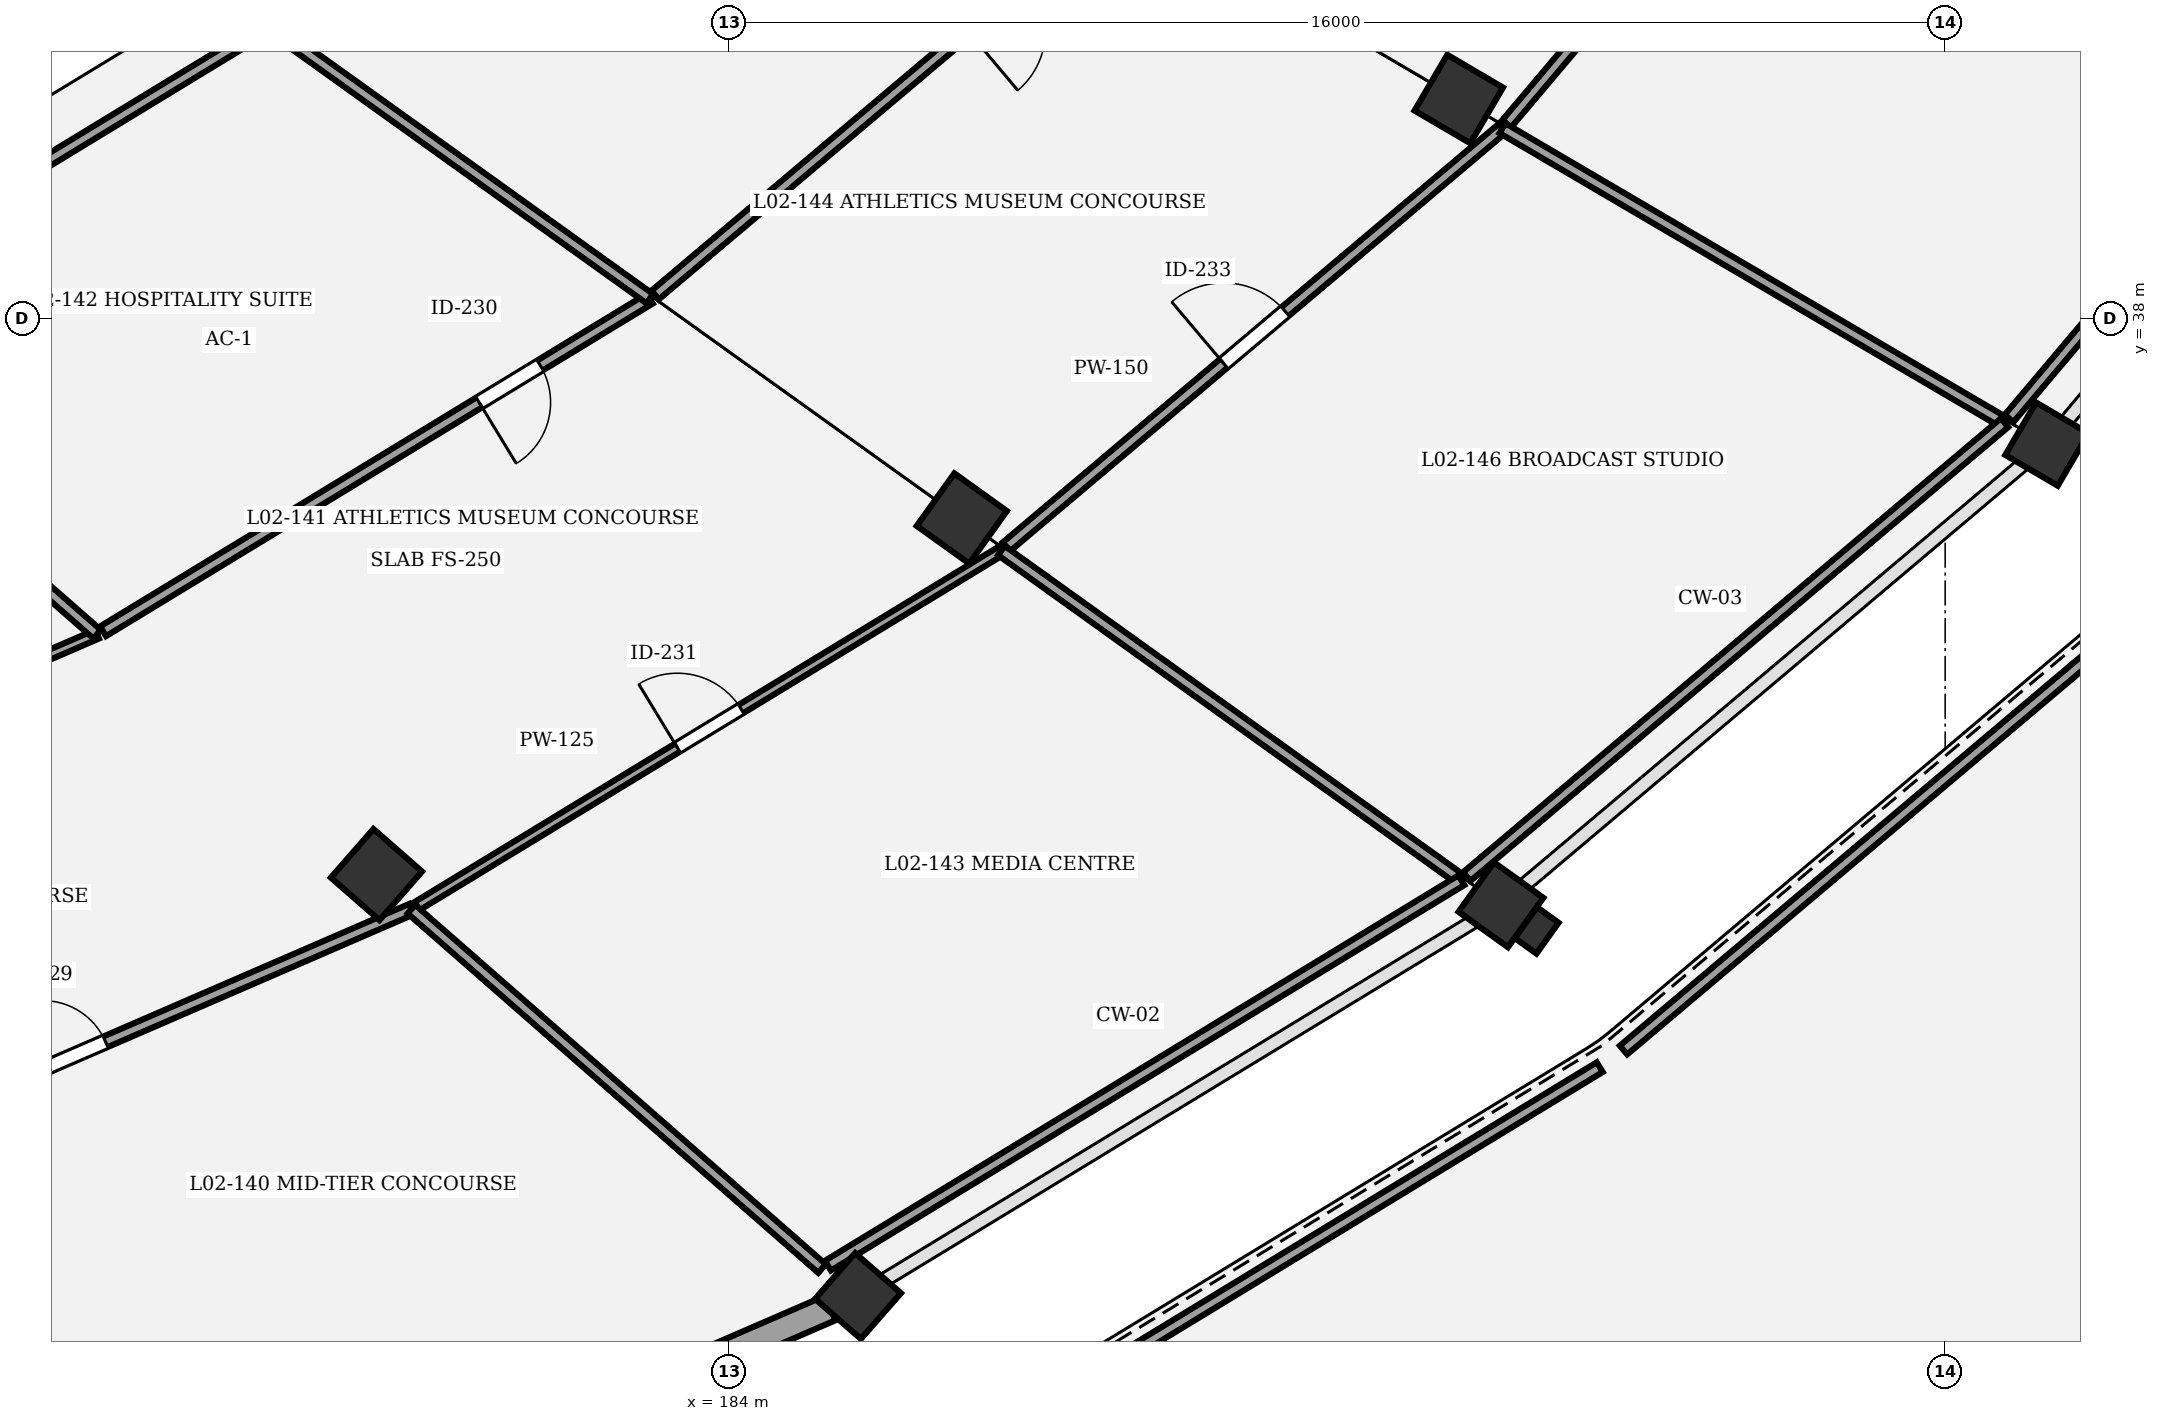
"""IFC4 building model, lengths in metres.
Left out: names, types, materials, properties, quantities, classifications, styles, units other than length and angle.
Written with IfcOpenShell. Run it as: python <this file> out.ifc"""

import sys

from ifc_helpers import new_model, si_unit, direction, frame, frame_2d, origin, origin_2d, place, context, subcontext, project, spatial, rectangle, extrude, element, fill, save


model = new_model("IFC4")
c1 = context("Model", 3, precision=1e-05, world=origin(), true_north=direction((0.0, 1.0)))
c2 = subcontext(c1, "Body", "Model", "MODEL_VIEW")
j1 = project(units=[si_unit("LENGTHUNIT", "METRE"), si_unit("PLANEANGLEUNIT", "RADIAN")], contexts=[c1])
p1 = place(None, origin())
s1 = spatial("IfcSite", under=j1, at=p1, CompositionType="ELEMENT")
p2 = place(p1, origin())
s2 = spatial("IfcBuilding", under=s1, at=p2, CompositionType="ELEMENT")
p3 = place(p2, frame((0.0, 0.0, 10.2)))
s3 = spatial("IfcBuildingStorey", under=s2, at=p3, CompositionType="ELEMENT", Elevation=10.2)
p4 = place(p3, frame((179.36, 30.683, 0.0), z_axis=(0.0, 0.0, 1.0), x_axis=(0.752529860433, -0.658558128912, 0.0)))
e1 = element("IfcColumn", 1, at=p4, inside=s3, PredefinedType="COLUMN", context=c2, shape_type="SweptSolid", body=[
    extrude(rectangle(XDim=0.85, YDim=0.85, at=origin_2d()), origin(), (0.0, 0.0, 1.0), 4.5),
])
p5 = place(p3, frame((185.696, 25.139, 0.0), z_axis=(0.0, 0.0, 1.0), x_axis=(0.752529860433, -0.658558128912, 0.0)))
e2 = element("IfcColumn", 2, at=p5, inside=s3, PredefinedType="COLUMN", context=c2, shape_type="SweptSolid", body=[
    extrude(rectangle(XDim=0.8, YDim=0.8, at=origin_2d()), origin(), (0.0, 0.0, 1.0), 4.5),
])
p6 = place(p3, frame((187.061, 35.368, 0.0), z_axis=(0.0, 0.0, 1.0), x_axis=(0.812897512265, -0.582406760395, 0.0)))
e3 = element("IfcColumn", 3, at=p6, inside=s3, PredefinedType="COLUMN", context=c2, shape_type="SweptSolid", body=[
    extrude(rectangle(XDim=0.85, YDim=0.85, at=origin_2d()), origin(), (0.0, 0.0, 1.0), 4.5),
])
p7 = place(p3, frame((194.156, 30.285, 0.0), z_axis=(0.0, 0.0, 1.0), x_axis=(0.812897512265, -0.582406760395, 0.0)))
e4 = element("IfcColumn", 4, at=p7, inside=s3, PredefinedType="COLUMN", context=c2, shape_type="SweptSolid", body=[
    extrude(rectangle(XDim=0.8, YDim=0.8, at=origin_2d()), origin(), (0.0, 0.0, 1.0), 4.5),
])
p8 = place(p3, frame((194.625, 29.949, 0.0), z_axis=(0.0, 0.0, 1.0), x_axis=(0.582406760395, 0.812897512265, 0.0)))
e5 = element("IfcColumn", 5, at=p8, inside=s3, PredefinedType="PILASTER", context=c2, shape_type="SweptSolid", body=[
    extrude(rectangle(XDim=0.5, YDim=0.35, at=origin_2d()), origin(), (0.0, 0.0, 1.0), 4.5),
])
p9 = place(p3, frame((193.6, 40.886, 0.0), z_axis=(0.0, 0.0, 1.0), x_axis=(0.862513669207, -0.506033764121, 0.0)))
e6 = element("IfcColumn", 6, at=p9, inside=s3, PredefinedType="COLUMN", context=c2, shape_type="SweptSolid", body=[
    extrude(rectangle(XDim=0.85, YDim=0.85, at=origin_2d()), origin(), (0.0, 0.0, 1.0), 4.5),
])
p10 = place(p3, frame((201.338, 36.346, 0.0), z_axis=(0.0, 0.0, 1.0), x_axis=(0.862513669207, -0.506033764121, 0.0)))
e7 = element("IfcColumn", 7, at=p10, inside=s3, PredefinedType="COLUMN", context=c2, shape_type="SweptSolid", body=[
    extrude(rectangle(XDim=0.8, YDim=0.8, at=origin_2d()), origin(), (0.0, 0.0, 1.0), 4.5),
])
p11 = place(p3, frame((185.331, 24.981, 0.0), z_axis=(0.0, 0.0, 1.0), x_axis=(-0.917498288986, -0.397739726088, 0.0)))
e8 = element("IfcWall", 8, at=p11, inside=s3, PredefinedType="STANDARD", context=c2, shape_type="SweptSolid", body=[
    extrude(rectangle(XDim=9.84, YDim=0.35, at=frame_2d((4.92, 0.0))), origin(), (0.0, 0.0, 1.0), 3.42),
])
p12 = place(p11, frame((4.02, 0.0, 0.0)))
e9 = element("IfcOpeningElement", 9, at=p12, cuts=e8, PredefinedType="OPENING", context=c2, shape_type="SweptSolid", body=[
    extrude(rectangle(XDim=1.8, YDim=2.4, at=frame_2d((0.9, 1.2))), frame((0.0, 0.185, 0.0), z_axis=(0.0, -1.0, 0.0), x_axis=(1.0, 0.0, 0.0)), (0.0, 0.0, 1.0), 0.37),
])
p13 = place(p3, frame((175.685, 33.846, 0.0), z_axis=(0.0, 0.0, 1.0), x_axis=(-0.917494590455, -0.397748257677, 0.0)))
e10 = element("IfcWall", 10, at=p13, inside=s3, PredefinedType="PARTITIONING", context=c2, shape_type="SweptSolid", body=[
    extrude(rectangle(XDim=9.049, YDim=0.125, at=frame_2d((4.525, 0.0))), origin(), (0.0, 0.0, 1.0), 3.25),
])
p14 = place(p13, frame((1.722, 0.0, 0.0)))
e11 = element("IfcOpeningElement", 11, at=p14, cuts=e10, PredefinedType="OPENING", context=c2, shape_type="SweptSolid", body=[
    extrude(rectangle(XDim=1.4, YDim=2.1, at=frame_2d((0.7, 1.05))), frame((0.0, 0.073, 0.0), z_axis=(0.0, -1.0, 0.0), x_axis=(1.0, 0.0, 0.0)), (0.0, 0.0, 1.0), 0.145),
])
p15 = place(p3, frame((170.946, 26.381, 0.0), z_axis=(0.0, 0.0, 1.0), x_axis=(0.917508957037, 0.39771511633, 0.0)))
e12 = element("IfcWall", 12, at=p15, inside=s3, PredefinedType="PARTITIONING", context=c2, shape_type="SweptSolid", body=[
    extrude(rectangle(XDim=9.671, YDim=0.15, at=frame_2d((4.836, 0.0))), origin(), (0.0, 0.0, 1.0), 3.25),
])
p16 = place(p15, frame((4.386, 0.0, 0.0)))
e13 = element("IfcOpeningElement", 13, at=p16, cuts=e12, PredefinedType="OPENING", context=c2, shape_type="SweptSolid", body=[
    extrude(rectangle(XDim=0.9, YDim=2.2, at=frame_2d((0.45, 1.1))), frame((0.0, 0.085, 0.0), z_axis=(0.0, -1.0, 0.0), x_axis=(1.0, 0.0, 0.0)), (0.0, 0.0, 1.0), 0.17),
])
p17 = place(p3, frame((182.957, 38.26, 0.0), z_axis=(0.0, 0.0, 1.0), x_axis=(-0.854330104408, -0.519730769439, 0.0)))
e14 = element("IfcWall", 14, at=p17, inside=s3, PredefinedType="PARTITIONING", context=c2, shape_type="SweptSolid", body=[
    extrude(rectangle(XDim=8.42, YDim=0.15, at=frame_2d((4.21, 0.0))), origin(), (0.0, 0.0, 1.0), 3.25),
])
p18 = place(p17, frame((1.688, 0.0, 0.0)))
e15 = element("IfcOpeningElement", 15, at=p18, cuts=e14, PredefinedType="OPENING", context=c2, shape_type="SweptSolid", body=[
    extrude(rectangle(XDim=0.94, YDim=2.2, at=frame_2d((0.47, 1.1))), frame((0.0, 0.085, 0.0), z_axis=(0.0, -1.0, 0.0), x_axis=(1.0, 0.0, 0.0)), (0.0, 0.0, 1.0), 0.17),
])
p19 = place(p3, frame((179.895, 30.269, 0.0), z_axis=(0.0, 0.0, 1.0), x_axis=(0.854321649351, 0.519744667554, 0.0)))
e16 = element("IfcWall", 16, at=p19, inside=s3, PredefinedType="PARTITIONING", context=c2, shape_type="SweptSolid", body=[
    extrude(rectangle(XDim=8.999, YDim=0.125, at=frame_2d((4.499, 0.0))), origin(), (0.0, 0.0, 1.0), 3.25),
])
p20 = place(p19, frame((4.009, 0.0, 0.0)))
e17 = element("IfcOpeningElement", 17, at=p20, cuts=e16, PredefinedType="OPENING", context=c2, shape_type="SweptSolid", body=[
    extrude(rectangle(XDim=0.98, YDim=2.2, at=frame_2d((0.49, 1.1))), frame((0.0, 0.073, 0.0), z_axis=(0.0, -1.0, 0.0), x_axis=(1.0, 0.0, 0.0)), (0.0, 0.0, 1.0), 0.145),
])
p21 = place(p3, frame((189.133, 43.461, 0.0), z_axis=(0.0, 0.0, 1.0), x_axis=(-0.764249122867, -0.644921141068, 0.0)))
e18 = element("IfcWall", 18, at=p21, inside=s3, PredefinedType="PARTITIONING", context=c2, shape_type="SweptSolid", body=[
    extrude(rectangle(XDim=7.99, YDim=0.15, at=frame_2d((3.995, 0.0))), origin(), (0.0, 0.0, 1.0), 3.25),
])
p22 = place(p21, frame((1.586, 0.0, 0.0)))
e19 = element("IfcOpeningElement", 19, at=p22, cuts=e18, PredefinedType="OPENING", context=c2, shape_type="SweptSolid", body=[
    extrude(rectangle(XDim=1.02, YDim=2.2, at=frame_2d((0.51, 1.1))), frame((0.0, 0.085, 0.0), z_axis=(0.0, -1.0, 0.0), x_axis=(1.0, 0.0, 0.0)), (0.0, 0.0, 1.0), 0.17),
])
p23 = place(p3, frame((187.649, 34.996, 0.0), z_axis=(0.0, 0.0, 1.0), x_axis=(0.764257572309, 0.644911128117, 0.0)))
e20 = element("IfcWall", 20, at=p23, inside=s3, PredefinedType="PARTITIONING", context=c2, shape_type="SweptSolid", body=[
    extrude(rectangle(XDim=8.539, YDim=0.15, at=frame_2d((4.269, 0.0))), origin(), (0.0, 0.0, 1.0), 3.25),
])
p24 = place(p23, frame((3.739, 0.0, 0.0)))
e21 = element("IfcOpeningElement", 21, at=p24, cuts=e20, PredefinedType="OPENING", context=c2, shape_type="SweptSolid", body=[
    extrude(rectangle(XDim=1.06, YDim=2.2, at=frame_2d((0.53, 1.1))), frame((0.0, 0.085, 0.0), z_axis=(0.0, -1.0, 0.0), x_axis=(1.0, 0.0, 0.0)), (0.0, 0.0, 1.0), 0.17),
])
p25 = place(p3, frame((194.232, 40.562, 0.0), z_axis=(0.0, 0.0, 1.0), x_axis=(0.64516519871, 0.76404310505, 0.0)))
e22 = element("IfcWall", 22, at=p25, inside=s3, PredefinedType="PARTITIONING", context=c2, shape_type="SweptSolid", body=[
    extrude(rectangle(XDim=8.313, YDim=0.15, at=frame_2d((4.157, 0.0))), origin(), (0.0, 0.0, 1.0), 3.25),
])
p26 = place(p25, frame((3.587, 0.0, 0.0)))
e23 = element("IfcOpeningElement", 23, at=p26, cuts=e22, PredefinedType="OPENING", context=c2, shape_type="SweptSolid", body=[
    extrude(rectangle(XDim=1.14, YDim=2.2, at=frame_2d((0.57, 1.1))), frame((0.0, 0.085, 0.0), z_axis=(0.0, -1.0, 0.0), x_axis=(1.0, 0.0, 0.0)), (0.0, 0.0, 1.0), 0.17),
])
p27 = place(p3, frame((171.216, 37.756, 0.0), z_axis=(0.0, 0.0, 1.0), x_axis=(0.752558865068, -0.658524984042, 0.0)))
e24 = element("IfcWall", 24, at=p27, inside=s3, PredefinedType="PARTITIONING", context=c2, shape_type="SweptSolid", body=[
    extrude(rectangle(XDim=5.938, YDim=0.15, at=frame_2d((2.969, 0.0))), origin(), (0.0, 0.0, 1.0), 3.25),
])
p28 = place(p3, frame((179.82, 30.228, 0.0), z_axis=(0.0, 0.0, 1.0), x_axis=(0.752576694707, -0.658504607869, 0.0)))
e25 = element("IfcWall", 25, at=p28, inside=s3, PredefinedType="PARTITIONING", context=c2, shape_type="SweptSolid", body=[
    extrude(rectangle(XDim=7.178, YDim=0.15, at=frame_2d((3.589, 0.0))), origin(), (0.0, 0.0, 1.0), 3.25),
])
p29 = place(p3, frame((171.291, 37.797, 0.0), z_axis=(0.0, 0.0, 1.0), x_axis=(0.854328586702, 0.519733264226, 0.0)))
e26 = element("IfcWall", 26, at=p29, inside=s3, PredefinedType="PARTITIONING", context=c2, shape_type="SweptSolid", body=[
    extrude(rectangle(XDim=7.793, YDim=0.15, at=frame_2d((3.897, 0.0))), origin(), (0.0, 0.0, 1.0), 3.25),
])
p30 = place(p3, frame((177.949, 41.848, 0.0), z_axis=(0.0, 0.0, 1.0), x_axis=(0.81288905718, -0.582418561446, 0.0)))
e27 = element("IfcWall", 27, at=p30, inside=s3, PredefinedType="PARTITIONING", context=c2, shape_type="SweptSolid", body=[
    extrude(rectangle(XDim=6.16, YDim=0.15, at=frame_2d((3.08, 0.0))), origin(), (0.0, 0.0, 1.0), 3.25),
])
p31 = place(p3, frame((187.582, 34.946, 0.0), z_axis=(0.0, 0.0, 1.0), x_axis=(0.812888534941, -0.582419290342, 0.0)))
e28 = element("IfcWall", 28, at=p31, inside=s3, PredefinedType="PARTITIONING", context=c2, shape_type="SweptSolid", body=[
    extrude(rectangle(XDim=7.446, YDim=0.15, at=frame_2d((3.723, 0.0))), origin(), (0.0, 0.0, 1.0), 3.25),
])
p32 = place(p3, frame((193.635, 30.609, 0.0), z_axis=(0.0, 0.0, 1.0), x_axis=(-0.854323689683, -0.519741313777, 0.0)))
e29 = element("IfcWall", 29, at=p32, inside=s3, PredefinedType="PARTITIONING", context=c2, shape_type="SweptSolid", body=[
    extrude(rectangle(XDim=9.756, YDim=0.15, at=frame_2d((4.878, 0.0))), origin(), (0.0, 0.0, 1.0), 3.25),
])
p33 = place(p3, frame((194.175, 40.503, 0.0), z_axis=(0.0, 0.0, 1.0), x_axis=(0.862503200943, -0.506051606422, 0.0)))
e30 = element("IfcWall", 30, at=p33, inside=s3, PredefinedType="PARTITIONING", context=c2, shape_type="SweptSolid", body=[
    extrude(rectangle(XDim=7.659, YDim=0.15, at=frame_2d((3.829, 0.0))), origin(), (0.0, 0.0, 1.0), 3.25),
])
p34 = place(p3, frame((200.781, 36.627, 0.0), z_axis=(0.0, 0.0, 1.0), x_axis=(-0.764252893528, -0.644916672706, 0.0)))
e31 = element("IfcWall", 31, at=p34, inside=s3, PredefinedType="PARTITIONING", context=c2, shape_type="SweptSolid", body=[
    extrude(rectangle(XDim=9.257, YDim=0.15, at=frame_2d((4.629, 0.0))), origin(), (0.0, 0.0, 1.0), 3.25),
])
p35 = place(p3, frame((206.656, 43.572, 0.0), z_axis=(0.0, 0.0, 1.0), x_axis=(-0.645166061073, -0.764042376861, 0.0)))
e32 = element("IfcWall", 32, at=p35, inside=s3, PredefinedType="PARTITIONING", context=c2, shape_type="SweptSolid", body=[
    extrude(rectangle(XDim=9.014, YDim=0.15, at=frame_2d((4.507, 0.0))), origin(), (0.0, 0.0, 1.0), 3.25),
])
p36 = place(p3, frame((186.996, 23.003, 0.0), z_axis=(0.0, 0.0, 1.0), x_axis=(0.854333268174, 0.519725568826, 0.0)))
e33 = element("IfcWall", 33, at=p36, inside=s3, PredefinedType="PARTITIONING", context=c2, shape_type="SweptSolid", body=[
    extrude(rectangle(XDim=9.902, YDim=0.15, at=frame_2d((4.951, 0.0))), origin(), (0.0, 0.0, 1.0), 3.25),
])
p37 = place(p3, frame((195.768, 28.375, 0.0), z_axis=(0.0, 0.0, 1.0), x_axis=(0.76426547638, 0.644901761212, 0.0)))
e34 = element("IfcWall", 34, at=p37, inside=s3, PredefinedType="PARTITIONING", context=c2, shape_type="SweptSolid", body=[
    extrude(rectangle(XDim=9.398, YDim=0.15, at=frame_2d((4.699, 0.0))), origin(), (0.0, 0.0, 1.0), 3.25),
])
p38 = place(p16, origin())
e35 = element("IfcDoor", 35, at=p38, inside=s3, OperationType="SINGLE_SWING_LEFT", PredefinedType="DOOR", context=c2, shape_type="SweptSolid", body=[
    extrude(rectangle(XDim=0.9, YDim=2.2, at=frame_2d((0.45, 1.1))), frame((0.0, 0.025, 0.0), z_axis=(0.0, -1.0, 0.0), x_axis=(1.0, 0.0, 0.0)), (0.0, 0.0, 1.0), 0.05),
])
fill(e13, e35)
p39 = place(p18, origin())
e36 = element("IfcDoor", 36, at=p39, inside=s3, OperationType="SINGLE_SWING_RIGHT", PredefinedType="DOOR", context=c2, shape_type="SweptSolid", body=[
    extrude(rectangle(XDim=0.94, YDim=2.2, at=frame_2d((0.47, 1.1))), frame((0.0, 0.025, 0.0), z_axis=(0.0, -1.0, 0.0), x_axis=(1.0, 0.0, 0.0)), (0.0, 0.0, 1.0), 0.05),
])
fill(e15, e36)
p40 = place(p20, origin())
e37 = element("IfcDoor", 37, at=p40, inside=s3, OperationType="SINGLE_SWING_LEFT", PredefinedType="DOOR", context=c2, shape_type="SweptSolid", body=[
    extrude(rectangle(XDim=0.98, YDim=2.2, at=frame_2d((0.49, 1.1))), frame((0.0, 0.025, 0.0), z_axis=(0.0, -1.0, 0.0), x_axis=(1.0, 0.0, 0.0)), (0.0, 0.0, 1.0), 0.05),
])
fill(e17, e37)
p41 = place(p24, origin())
e38 = element("IfcDoor", 38, at=p41, inside=s3, OperationType="SINGLE_SWING_LEFT", PredefinedType="DOOR", context=c2, shape_type="SweptSolid", body=[
    extrude(rectangle(XDim=1.06, YDim=2.2, at=frame_2d((0.53, 1.1))), frame((0.0, 0.025, 0.0), z_axis=(0.0, -1.0, 0.0), x_axis=(1.0, 0.0, 0.0)), (0.0, 0.0, 1.0), 0.05),
])
fill(e21, e38)
save(model, sys.argv[1])
